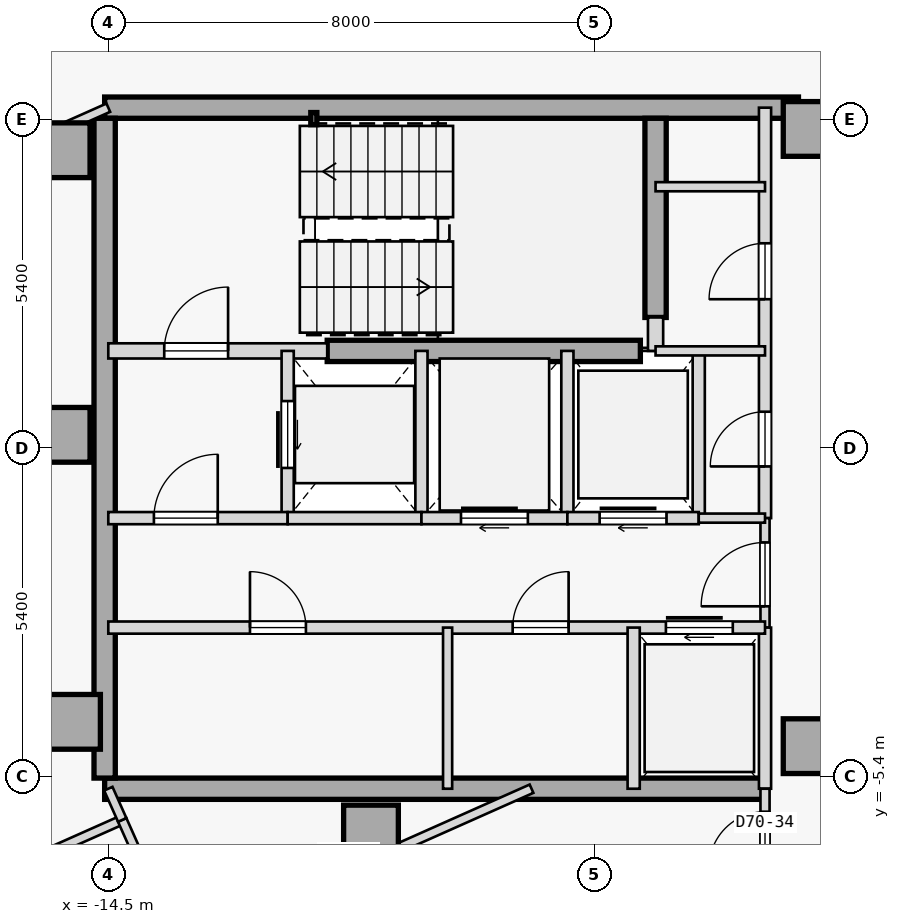
"""IFC4 building model, lengths in metres.
Left out: names, types, materials, properties, quantities, classifications, styles, units other than length and angle.
Written with IfcOpenShell. Run it as: python <this file> out.ifc"""

import sys

from ifc_helpers import new_model, si_unit, direction, frame, frame_2d, origin, origin_2d, place, context, subcontext, project, spatial, rectangle, hollow_rectangle, extrude, element, fill, save


model = new_model("IFC4")
c1 = context("Model", 3, precision=1e-05, world=origin(), true_north=direction((0.0, 1.0)))
c2 = subcontext(c1, "Body", "Model", "MODEL_VIEW")
j1 = project(units=[si_unit("LENGTHUNIT", "METRE"), si_unit("PLANEANGLEUNIT", "RADIAN")], contexts=[c1])
p1 = place(None, origin())
s1 = spatial("IfcSite", under=j1, at=p1, CompositionType="ELEMENT")
p2 = place(p1, origin())
s2 = spatial("IfcBuilding", under=s1, at=p2, CompositionType="ELEMENT")
p3 = place(p2, frame((0.0, 0.0, 262.2)))
s3 = spatial("IfcBuildingStorey", under=s2, at=p3, CompositionType="ELEMENT", Elevation=262.2)
for number, where, z_axis, x_axis in (
    (1, (-15.25, 4.9, 0.0), (0.0, 0.0, 1.0), (1.0, 0.0, 0.0)),
    (2, (-15.25, 0.22, 0.0), (0.0, 0.0, 1.0), (1.0, 0.0, 0.0)),
    (3, (-15.08, -4.5, 0.0), (0.0, 0.0, 1.0), (1.0, 0.0, 0.0)),
    (4, (-10.18, -6.32, 0.0), (0.0, 0.0, 1.0), (1.0, 0.0, 0.0)),
    (5, (-2.95, -4.9, 0.0), (0.0, 0.0, 1.0), (1.0, 0.0, 0.0)),
    (6, (-2.95, 5.25, 0.0), (0.0, 0.0, 1.0), (1.0, 0.0, 0.0)),
):
    element("IfcColumn", number, at=place(p3, frame(where, z_axis=z_axis, x_axis=x_axis)), inside=s3, PredefinedType="COLUMN", context=c2, shape_type="SweptSolid", body=[
        extrude(rectangle(XDim=0.9, YDim=0.9, at=origin_2d()), origin(), (0.0, 0.0, 1.0), 3.35),
    ])
p4 = place(p3, frame((-14.56, 5.6, 0.0), z_axis=(0.0, 0.0, 1.0), x_axis=(1.0, 0.0, 0.0)))
e7 = element("IfcWall", 7, at=p4, inside=s3, PredefinedType="SHEAR", context=c2, shape_type="SweptSolid", body=[
    extrude(rectangle(XDim=11.41, YDim=0.35, at=frame_2d((5.705, 0.0))), origin(), (0.0, 0.0, 1.0), 3.125),
])
p5 = place(p3, frame((-14.56, -5.6, 0.0), z_axis=(0.0, 0.0, 1.0), x_axis=(1.0, 0.0, 0.0)))
e8 = element("IfcWall", 8, at=p5, inside=s3, PredefinedType="SHEAR", context=c2, shape_type="SweptSolid", body=[
    extrude(rectangle(XDim=10.86, YDim=0.35, at=frame_2d((5.43, 0.0))), origin(), (0.0, 0.0, 1.0), 3.125),
])
p6 = place(p3, frame((-14.56, -5.425, 0.0), z_axis=(0.0, 0.0, 1.0), x_axis=(0.0, 1.0, 0.0)))
e9 = element("IfcWall", 9, at=p6, inside=s3, PredefinedType="SHEAR", context=c2, shape_type="SweptSolid", body=[
    extrude(rectangle(XDim=10.85, YDim=0.35, at=frame_2d((5.425, 0.0))), origin(), (0.0, 0.0, 1.0), 3.125),
])
p7 = place(p3, frame((-5.5, 2.15, 0.0), z_axis=(0.0, 0.0, 1.0), x_axis=(0.0, 1.0, 0.0)))
e10 = element("IfcWall", 10, at=p7, inside=s3, PredefinedType="SHEAR", context=c2, shape_type="SweptSolid", body=[
    extrude(rectangle(XDim=3.275, YDim=0.35, at=frame_2d((1.638, 0.0))), origin(), (0.0, 0.0, 1.0), 3.125),
])
p8 = place(p3, frame((-10.9, 1.6, 0.0), z_axis=(0.0, 0.0, 1.0), x_axis=(1.0, 0.0, 0.0)))
e11 = element("IfcWall", 11, at=p8, inside=s3, PredefinedType="SHEAR", context=c2, shape_type="SweptSolid", body=[
    extrude(rectangle(XDim=5.15, YDim=0.35, at=frame_2d((2.575, 0.0))), origin(), (0.0, 0.0, 1.0), 3.125),
])
p9 = place(p3, frame((-11.12, 5.42, 0.0), z_axis=(0.0, 0.0, 1.0), x_axis=(1.0, 0.0, 0.0)))
e12 = element("IfcColumn", 12, at=p9, inside=s3, PredefinedType="COLUMN", context=c2, shape_type="SweptSolid", body=[
    extrude(hollow_rectangle(XDim=0.1, YDim=0.2, WallThickness=0.008, at=origin_2d()), origin(), (0.0, 0.0, 1.0), 3.35),
])
p10 = place(p3, frame((-14.5, 1.6, 0.0), z_axis=(0.0, 0.0, 1.0), x_axis=(1.0, 0.0, 0.0)))
e13 = element("IfcWall", 13, at=p10, inside=s3, PredefinedType="STANDARD", context=c2, shape_type="SweptSolid", body=[
    extrude(rectangle(XDim=3.6, YDim=0.25, at=frame_2d((1.8, 0.0))), origin(), (0.0, 0.0, 1.0), 3.125),
])
p11 = place(p10, frame((0.92, 0.0, 0.0)))
e14 = element("IfcOpeningElement", 14, at=p11, cuts=e13, PredefinedType="OPENING", context=c2, shape_type="SweptSolid", body=[
    extrude(rectangle(XDim=1.05, YDim=2.15, at=frame_2d((0.525, 1.075))), frame((0.0, 0.135, 0.0), z_axis=(0.0, -1.0, 0.0), x_axis=(1.0, 0.0, 0.0)), (0.0, 0.0, 1.0), 0.27),
])
p12 = place(p3, frame((-5.5, 1.6, 0.0), z_axis=(0.0, 0.0, 1.0), x_axis=(0.0, 1.0, 0.0)))
e15 = element("IfcWall", 15, at=p12, inside=s3, PredefinedType="STANDARD", context=c2, shape_type="SweptSolid", body=[
    extrude(rectangle(XDim=0.55, YDim=0.25, at=frame_2d((0.275, 0.0))), origin(), (0.0, 0.0, 1.0), 3.125),
])
p13 = place(p3, frame((-3.7, -1.15, 0.0), z_axis=(0.0, 0.0, 1.0), x_axis=(0.0, 1.0, 0.0)))
e16 = element("IfcWall", 16, at=p13, inside=s3, PredefinedType="STANDARD", context=c2, shape_type="SweptSolid", body=[
    extrude(rectangle(XDim=6.75, YDim=0.2, at=frame_2d((3.375, 0.0))), origin(), (0.0, 0.0, 1.0), 3.125),
])
p14 = place(p13, frame((3.6, 0.0, 0.0)))
e17 = element("IfcOpeningElement", 17, at=p14, cuts=e16, PredefinedType="OPENING", context=c2, shape_type="SweptSolid", body=[
    extrude(rectangle(XDim=0.92, YDim=2.15, at=frame_2d((0.46, 1.075))), frame((0.0, 0.11, 0.0), z_axis=(0.0, -1.0, 0.0), x_axis=(1.0, 0.0, 0.0)), (0.0, 0.0, 1.0), 0.22),
])
p15 = place(p13, frame((0.85, 0.0, 0.0)))
e18 = element("IfcOpeningElement", 18, at=p15, cuts=e16, PredefinedType="OPENING", context=c2, shape_type="SweptSolid", body=[
    extrude(rectangle(XDim=0.9, YDim=2.15, at=frame_2d((0.45, 1.075))), frame((0.0, 0.11, 0.0), z_axis=(0.0, -1.0, 0.0), x_axis=(1.0, 0.0, 0.0)), (0.0, 0.0, 1.0), 0.22),
])
p16 = place(p3, frame((-3.7, -2.95, 0.0), z_axis=(0.0, 0.0, 1.0), x_axis=(0.0, 1.0, 0.0)))
e19 = element("IfcWall", 19, at=p16, inside=s3, PredefinedType="PARTITIONING", context=c2, shape_type="SweptSolid", body=[
    extrude(rectangle(XDim=1.8, YDim=0.15, at=frame_2d((0.9, 0.0))), origin(), (0.0, 0.0, 1.0), 3.125),
])
p17 = place(p16, frame((0.35, 0.0, 0.0)))
e20 = element("IfcOpeningElement", 20, at=p17, cuts=e19, PredefinedType="OPENING", context=c2, shape_type="SweptSolid", body=[
    extrude(rectangle(XDim=1.05, YDim=2.18, at=frame_2d((0.525, 1.09))), frame((0.0, 0.085, 0.0), z_axis=(0.0, -1.0, 0.0), x_axis=(1.0, 0.0, 0.0)), (0.0, 0.0, 1.0), 0.17),
])
p18 = place(p3, frame((-3.7, -5.6, 0.0), z_axis=(0.0, 0.0, 1.0), x_axis=(0.0, 1.0, 0.0)))
e21 = element("IfcWall", 21, at=p18, inside=s3, PredefinedType="STANDARD", context=c2, shape_type="SweptSolid", body=[
    extrude(rectangle(XDim=2.65, YDim=0.2, at=frame_2d((1.325, 0.0))), origin(), (0.0, 0.0, 1.0), 3.125),
])
p19 = place(p3, frame((-11.55, -1.15, 0.0), z_axis=(0.0, 0.0, 1.0), x_axis=(0.0, 1.0, 0.0)))
e22 = element("IfcWall", 22, at=p19, inside=s3, PredefinedType="STANDARD", context=c2, shape_type="SweptSolid", body=[
    extrude(rectangle(XDim=2.75, YDim=0.2, at=frame_2d((1.375, 0.0))), origin(), (0.0, 0.0, 1.0), 3.125),
])
p20 = place(p19, frame((0.825, 0.0, 0.0)))
e23 = element("IfcOpeningElement", 23, at=p20, cuts=e22, PredefinedType="OPENING", context=c2, shape_type="SweptSolid", body=[
    extrude(rectangle(XDim=1.1, YDim=2.15, at=frame_2d((0.55, 1.075))), frame((0.0, 0.11, 0.0), z_axis=(0.0, -1.0, 0.0), x_axis=(1.0, 0.0, 0.0)), (0.0, 0.0, 1.0), 0.22),
])
p21 = place(p3, frame((-9.35, -1.15, 0.0), z_axis=(0.0, 0.0, 1.0), x_axis=(0.0, 1.0, 0.0)))
e24 = element("IfcWall", 24, at=p21, inside=s3, PredefinedType="STANDARD", context=c2, shape_type="SweptSolid", body=[
    extrude(rectangle(XDim=2.75, YDim=0.2, at=frame_2d((1.375, 0.0))), origin(), (0.0, 0.0, 1.0), 3.125),
])
p22 = place(p3, frame((-14.5, -1.15, 0.0), z_axis=(0.0, 0.0, 1.0), x_axis=(1.0, 0.0, 0.0)))
e25 = element("IfcWall", 25, at=p22, inside=s3, PredefinedType="STANDARD", context=c2, shape_type="SweptSolid", body=[
    extrude(rectangle(XDim=2.95, YDim=0.2, at=frame_2d((1.475, 0.0))), origin(), (0.0, 0.0, 1.0), 3.125),
])
p23 = place(p22, frame((0.75, 0.0, 0.0)))
e26 = element("IfcOpeningElement", 26, at=p23, cuts=e25, PredefinedType="OPENING", context=c2, shape_type="SweptSolid", body=[
    extrude(rectangle(XDim=1.05, YDim=2.18, at=frame_2d((0.525, 1.09))), frame((0.0, 0.11, 0.0), z_axis=(0.0, -1.0, 0.0), x_axis=(1.0, 0.0, 0.0)), (0.0, 0.0, 1.0), 0.22),
])
p24 = place(p3, frame((-11.55, -1.15, 0.0), z_axis=(0.0, 0.0, 1.0), x_axis=(1.0, 0.0, 0.0)))
e27 = element("IfcWall", 27, at=p24, inside=s3, PredefinedType="STANDARD", context=c2, shape_type="SweptSolid", body=[
    extrude(rectangle(XDim=2.2, YDim=0.2, at=frame_2d((1.1, 0.0))), origin(), (0.0, 0.0, 1.0), 3.125),
])
p25 = place(p3, frame((-6.95, -1.15, 0.0), z_axis=(0.0, 0.0, 1.0), x_axis=(0.0, 1.0, 0.0)))
e28 = element("IfcWall", 28, at=p25, inside=s3, PredefinedType="STANDARD", context=c2, shape_type="SweptSolid", body=[
    extrude(rectangle(XDim=2.75, YDim=0.2, at=frame_2d((1.375, 0.0))), origin(), (0.0, 0.0, 1.0), 3.125),
])
p26 = place(p3, frame((-9.35, -1.15, 0.0), z_axis=(0.0, 0.0, 1.0), x_axis=(1.0, 0.0, 0.0)))
e29 = element("IfcWall", 29, at=p26, inside=s3, PredefinedType="STANDARD", context=c2, shape_type="SweptSolid", body=[
    extrude(rectangle(XDim=2.4, YDim=0.2, at=frame_2d((1.2, 0.0))), origin(), (0.0, 0.0, 1.0), 3.125),
])
p27 = place(p26, frame((0.65, 0.0, 0.0)))
e30 = element("IfcOpeningElement", 30, at=p27, cuts=e29, PredefinedType="OPENING", context=c2, shape_type="SweptSolid", body=[
    extrude(rectangle(XDim=1.1, YDim=2.15, at=frame_2d((0.55, 1.075))), frame((0.0, 0.11, 0.0), z_axis=(0.0, -1.0, 0.0), x_axis=(1.0, 0.0, 0.0)), (0.0, 0.0, 1.0), 0.22),
])
p28 = place(p3, frame((-4.79, -1.15, 0.0), z_axis=(0.0, 0.0, 1.0), x_axis=(0.0, 1.0, 0.0)))
e31 = element("IfcWall", 31, at=p28, inside=s3, PredefinedType="STANDARD", context=c2, shape_type="SweptSolid", body=[
    extrude(rectangle(XDim=2.75, YDim=0.2, at=frame_2d((1.375, 0.0))), origin(), (0.0, 0.0, 1.0), 3.125),
])
p29 = place(p3, frame((-6.95, -1.15, 0.0), z_axis=(0.0, 0.0, 1.0), x_axis=(1.0, 0.0, 0.0)))
e32 = element("IfcWall", 32, at=p29, inside=s3, PredefinedType="STANDARD", context=c2, shape_type="SweptSolid", body=[
    extrude(rectangle(XDim=2.16, YDim=0.2, at=frame_2d((1.08, 0.0))), origin(), (0.0, 0.0, 1.0), 3.125),
])
p30 = place(p29, frame((0.53, 0.0, 0.0)))
e33 = element("IfcOpeningElement", 33, at=p30, cuts=e32, PredefinedType="OPENING", context=c2, shape_type="SweptSolid", body=[
    extrude(rectangle(XDim=1.1, YDim=2.15, at=frame_2d((0.55, 1.075))), frame((0.0, 0.11, 0.0), z_axis=(0.0, -1.0, 0.0), x_axis=(1.0, 0.0, 0.0)), (0.0, 0.0, 1.0), 0.22),
])
p31 = place(p3, frame((-4.79, -1.15, 0.0), z_axis=(0.0, 0.0, 1.0), x_axis=(1.0, 0.0, 0.0)))
e34 = element("IfcWall", 34, at=p31, inside=s3, PredefinedType="PARTITIONING", context=c2, shape_type="SweptSolid", body=[
    extrude(rectangle(XDim=1.09, YDim=0.15, at=frame_2d((0.545, 0.0))), origin(), (0.0, 0.0, 1.0), 3.125),
])
p32 = place(p3, frame((-14.5, -2.95, 0.0), z_axis=(0.0, 0.0, 1.0), x_axis=(1.0, 0.0, 0.0)))
e35 = element("IfcWall", 35, at=p32, inside=s3, PredefinedType="STANDARD", context=c2, shape_type="SweptSolid", body=[
    extrude(rectangle(XDim=10.8, YDim=0.2, at=frame_2d((5.4, 0.0))), origin(), (0.0, 0.0, 1.0), 3.125),
])
p33 = place(p32, frame((9.17, 0.0, 0.0)))
e36 = element("IfcOpeningElement", 36, at=p33, cuts=e35, PredefinedType="OPENING", context=c2, shape_type="SweptSolid", body=[
    extrude(rectangle(XDim=1.1, YDim=2.15, at=frame_2d((0.55, 1.075))), frame((0.0, 0.11, 0.0), z_axis=(0.0, -1.0, 0.0), x_axis=(1.0, 0.0, 0.0)), (0.0, 0.0, 1.0), 0.22),
])
p34 = place(p32, frame((2.33, 0.0, 0.0)))
e37 = element("IfcOpeningElement", 37, at=p34, cuts=e35, PredefinedType="OPENING", context=c2, shape_type="SweptSolid", body=[
    extrude(rectangle(XDim=0.92, YDim=2.15, at=frame_2d((0.46, 1.075))), frame((0.0, 0.11, 0.0), z_axis=(0.0, -1.0, 0.0), x_axis=(1.0, 0.0, 0.0)), (0.0, 0.0, 1.0), 0.22),
])
p35 = place(p32, frame((6.65, 0.0, 0.0)))
e38 = element("IfcOpeningElement", 38, at=p35, cuts=e35, PredefinedType="OPENING", context=c2, shape_type="SweptSolid", body=[
    extrude(rectangle(XDim=0.92, YDim=2.15, at=frame_2d((0.46, 1.075))), frame((0.0, 0.11, 0.0), z_axis=(0.0, -1.0, 0.0), x_axis=(1.0, 0.0, 0.0)), (0.0, 0.0, 1.0), 0.22),
])
p36 = place(p3, frame((-5.86, -5.6, 0.0), z_axis=(0.0, 0.0, 1.0), x_axis=(0.0, 1.0, 0.0)))
e39 = element("IfcWall", 39, at=p36, inside=s3, PredefinedType="STANDARD", context=c2, shape_type="SweptSolid", body=[
    extrude(rectangle(XDim=2.65, YDim=0.2, at=frame_2d((1.325, 0.0))), origin(), (0.0, 0.0, 1.0), 3.125),
])
p37 = place(p3, frame((-8.92, -5.6, 0.0), z_axis=(0.0, 0.0, 1.0), x_axis=(0.0, 1.0, 0.0)))
e40 = element("IfcWall", 40, at=p37, inside=s3, PredefinedType="PARTITIONING", context=c2, shape_type="SweptSolid", body=[
    extrude(rectangle(XDim=2.65, YDim=0.15, at=frame_2d((1.325, 0.0))), origin(), (0.0, 0.0, 1.0), 3.125),
])
for number, where, z_axis, x_axis in (
    (41, (-5.5, 4.3, 0.0), (0.0, 0.0, 1.0), (1.0, 0.0, 0.0)),
    (42, (-5.5, 1.6, 0.0), (0.0, 0.0, 1.0), (1.0, 0.0, 0.0)),
):
    element("IfcWall", number, at=place(p3, frame(where, z_axis=z_axis, x_axis=x_axis)), inside=s3, PredefinedType="PARTITIONING", context=c2, shape_type="SweptSolid", body=[
        extrude(rectangle(XDim=1.8, YDim=0.15, at=frame_2d((0.9, 0.0))), origin(), (0.0, 0.0, 1.0), 3.125),
    ])
p38 = place(p3, frame((-17.499, 6.038, 0.0), z_axis=(0.0, 0.0, 1.0), x_axis=(0.913541623157, 0.406745255362, 0.0)))
e43 = element("IfcWall", 43, at=p38, inside=s3, PredefinedType="PARTITIONING", context=c2, shape_type="SweptSolid", body=[
    extrude(rectangle(XDim=17.879, YDim=0.15, at=frame_2d((8.939, 0.0))), origin(), (0.0, 0.0, 1.0), 3.125),
])
p39 = place(p38, frame((8.465, 0.0, 0.0)))
e44 = element("IfcOpeningElement", 44, at=p39, cuts=e43, PredefinedType="OPENING", context=c2, shape_type="SweptSolid", body=[
    extrude(rectangle(XDim=0.95, YDim=2.15, at=frame_2d((0.475, 1.075))), frame((0.0, 0.085, 0.0), z_axis=(0.0, -1.0, 0.0), x_axis=(1.0, 0.0, 0.0)), (0.0, 0.0, 1.0), 0.17),
])
p40 = place(p3, frame((-3.7, -7.118, 0.0), z_axis=(0.0, 0.0, 1.0), x_axis=(0.000321543392, 0.999999948305, 0.0)))
e45 = element("IfcWall", 45, at=p40, inside=s3, PredefinedType="PARTITIONING", context=c2, shape_type="SweptSolid", body=[
    extrude(rectangle(XDim=1.519, YDim=0.15, at=frame_2d((0.759, 0.0))), origin(), (0.0, 0.0, 1.0), 3.125),
])
p41 = place(p40, frame((0.22, 0.0, 0.0)))
e46 = element("IfcOpeningElement", 46, at=p41, cuts=e45, PredefinedType="OPENING", context=c2, shape_type="SweptSolid", body=[
    extrude(rectangle(XDim=0.92, YDim=2.15, at=frame_2d((0.46, 1.075))), frame((0.0, 0.085, 0.0), z_axis=(0.0, -1.0, 0.0), x_axis=(1.0, 0.0, 0.0)), (0.0, 0.0, 1.0), 0.17),
])
p42 = place(p3, frame((-18.661, 3.747, 0.0), z_axis=(0.0, 0.0, 1.0), x_axis=(0.913535055583, 0.40676000568, 0.0)))
e47 = element("IfcWall", 47, at=p42, inside=s3, PredefinedType="PARTITIONING", context=c2, shape_type="SweptSolid", body=[
    extrude(rectangle(XDim=4.555, YDim=0.15, at=frame_2d((2.277, 0.0))), origin(), (0.0, 0.0, 1.0), 3.125),
])
p43 = place(p42, frame((1.134, 0.0, 0.0)))
e48 = element("IfcOpeningElement", 48, at=p43, cuts=e47, PredefinedType="OPENING", context=c2, shape_type="SweptSolid", body=[
    extrude(rectangle(XDim=0.92, YDim=2.15, at=frame_2d((0.46, 1.075))), frame((0.0, 0.085, 0.0), z_axis=(0.0, -1.0, 0.0), x_axis=(1.0, 0.0, 0.0)), (0.0, 0.0, 1.0), 0.17),
])
p44 = place(p3, frame((-25.014, -10.896, 0.0), z_axis=(0.0, 0.0, 1.0), x_axis=(0.913544247064, 0.406739362069, 0.0)))
e49 = element("IfcWall", 49, at=p44, inside=s3, PredefinedType="PARTITIONING", context=c2, shape_type="SweptSolid", body=[
    extrude(rectangle(XDim=11.76, YDim=0.15, at=frame_2d((5.88, 0.0))), origin(), (0.0, 0.0, 1.0), 3.125),
])
p45 = place(p44, frame((5.42, 0.0, 0.0)))
e50 = element("IfcOpeningElement", 50, at=p45, cuts=e49, PredefinedType="OPENING", context=c2, shape_type="SweptSolid", body=[
    extrude(rectangle(XDim=0.92, YDim=2.15, at=frame_2d((0.46, 1.075))), frame((0.0, 0.085, 0.0), z_axis=(0.0, -1.0, 0.0), x_axis=(1.0, 0.0, 0.0)), (0.0, 0.0, 1.0), 0.17),
])
p46 = place(p3, frame((-13.348, -8.186, 0.0), z_axis=(0.0, 0.0, 1.0), x_axis=(-0.40673740295, 0.913545119324, 0.0)))
e51 = element("IfcWall", 51, at=p46, inside=s3, PredefinedType="PARTITIONING", context=c2, shape_type="SweptSolid", body=[
    extrude(rectangle(XDim=2.269, YDim=0.15, at=frame_2d((1.134, 0.0))), origin(), (0.0, 0.0, 1.0), 3.125),
])
p47 = place(p3, frame((-14.271, -6.113, 0.0), z_axis=(0.0, 0.0, 1.0), x_axis=(-0.406622099206, 0.913596447255, 0.0)))
e52 = element("IfcWall", 52, at=p47, inside=s3, PredefinedType="PARTITIONING", context=c2, shape_type="SweptSolid", body=[
    extrude(rectangle(XDim=0.562, YDim=0.15, at=frame_2d((0.281, 0.0))), origin(), (0.0, 0.0, 1.0), 3.125),
])
p48 = place(p3, frame((-13.348, -8.186, 0.0), z_axis=(0.0, 0.0, 1.0), x_axis=(0.913551673432, 0.406722681896, 0.0)))
e53 = element("IfcWall", 53, at=p48, inside=s3, PredefinedType="PARTITIONING", context=c2, shape_type="SweptSolid", body=[
    extrude(rectangle(XDim=6.358, YDim=0.15, at=frame_2d((3.179, 0.0))), origin(), (0.0, 0.0, 1.0), 3.125),
])
p49 = place(p48, frame((0.939, 0.0, 0.0)))
e54 = element("IfcOpeningElement", 54, at=p49, cuts=e53, PredefinedType="OPENING", context=c2, shape_type="SweptSolid", body=[
    extrude(rectangle(XDim=0.92, YDim=2.15, at=frame_2d((0.46, 1.075))), frame((0.0, 0.085, 0.0), z_axis=(0.0, -1.0, 0.0), x_axis=(1.0, 0.0, 0.0)), (0.0, 0.0, 1.0), 0.17),
])
p50 = place(p11, origin())
e55 = element("IfcDoor", 55, at=p50, inside=s3, OperationType="SINGLE_SWING_RIGHT", PredefinedType="DOOR", context=c2, shape_type="SweptSolid", body=[
    extrude(rectangle(XDim=1.05, YDim=2.15, at=frame_2d((0.525, 1.075))), frame((0.0, 0.025, 0.0), z_axis=(0.0, -1.0, 0.0), x_axis=(1.0, 0.0, 0.0)), (0.0, 0.0, 1.0), 0.05),
])
fill(e14, e55)
p51 = place(p23, origin())
e56 = element("IfcDoor", 56, at=p51, inside=s3, OperationType="SINGLE_SWING_RIGHT", PredefinedType="DOOR", context=c2, shape_type="SweptSolid", body=[
    extrude(rectangle(XDim=1.05, YDim=2.18, at=frame_2d((0.525, 1.09))), frame((0.0, 0.025, 0.0), z_axis=(0.0, -1.0, 0.0), x_axis=(1.0, 0.0, 0.0)), (0.0, 0.0, 1.0), 0.05),
])
fill(e26, e56)
p52 = place(p17, origin())
e57 = element("IfcDoor", 57, at=p52, inside=s3, OperationType="SINGLE_SWING_LEFT", PredefinedType="DOOR", context=c2, shape_type="SweptSolid", body=[
    extrude(rectangle(XDim=1.05, YDim=2.18, at=frame_2d((0.525, 1.09))), frame((0.0, 0.025, 0.0), z_axis=(0.0, -1.0, 0.0), x_axis=(1.0, 0.0, 0.0)), (0.0, 0.0, 1.0), 0.05),
])
fill(e20, e57)
p53 = place(p20, origin())
e58 = element("IfcDoor", 58, at=p53, inside=s3, OperationType="SLIDING_TO_RIGHT", PredefinedType="DOOR", context=c2, shape_type="SweptSolid", body=[
    extrude(rectangle(XDim=1.1, YDim=2.15, at=frame_2d((0.55, 1.075))), frame((0.0, 0.025, 0.0), z_axis=(0.0, -1.0, 0.0), x_axis=(1.0, 0.0, 0.0)), (0.0, 0.0, 1.0), 0.05),
])
fill(e23, e58)
p54 = place(p27, origin())
e59 = element("IfcDoor", 59, at=p54, inside=s3, OperationType="SLIDING_TO_RIGHT", PredefinedType="DOOR", context=c2, shape_type="SweptSolid", body=[
    extrude(rectangle(XDim=1.1, YDim=2.15, at=frame_2d((0.55, 1.075))), frame((0.0, 0.025, 0.0), z_axis=(0.0, -1.0, 0.0), x_axis=(1.0, 0.0, 0.0)), (0.0, 0.0, 1.0), 0.05),
])
fill(e30, e59)
p55 = place(p30, origin())
e60 = element("IfcDoor", 60, at=p55, inside=s3, OperationType="SLIDING_TO_RIGHT", PredefinedType="DOOR", context=c2, shape_type="SweptSolid", body=[
    extrude(rectangle(XDim=1.1, YDim=2.15, at=frame_2d((0.55, 1.075))), frame((0.0, 0.025, 0.0), z_axis=(0.0, -1.0, 0.0), x_axis=(1.0, 0.0, 0.0)), (0.0, 0.0, 1.0), 0.05),
])
fill(e33, e60)
p56 = place(p33, origin())
e61 = element("IfcDoor", 61, at=p56, inside=s3, OperationType="SLIDING_TO_RIGHT", PredefinedType="DOOR", context=c2, shape_type="SweptSolid", body=[
    extrude(rectangle(XDim=1.1, YDim=2.15, at=frame_2d((0.55, 1.075))), frame((0.0, 0.025, 0.0), z_axis=(0.0, -1.0, 0.0), x_axis=(1.0, 0.0, 0.0)), (0.0, 0.0, 1.0), 0.05),
])
fill(e36, e61)
p57 = place(p34, origin())
e62 = element("IfcDoor", 62, at=p57, inside=s3, OperationType="SINGLE_SWING_LEFT", PredefinedType="DOOR", context=c2, shape_type="SweptSolid", body=[
    extrude(rectangle(XDim=0.92, YDim=2.15, at=frame_2d((0.46, 1.075))), frame((0.0, 0.025, 0.0), z_axis=(0.0, -1.0, 0.0), x_axis=(1.0, 0.0, 0.0)), (0.0, 0.0, 1.0), 0.05),
])
fill(e37, e62)
p58 = place(p35, origin())
e63 = element("IfcDoor", 63, at=p58, inside=s3, OperationType="SINGLE_SWING_RIGHT", PredefinedType="DOOR", context=c2, shape_type="SweptSolid", body=[
    extrude(rectangle(XDim=0.92, YDim=2.15, at=frame_2d((0.46, 1.075))), frame((0.0, 0.025, 0.0), z_axis=(0.0, -1.0, 0.0), x_axis=(1.0, 0.0, 0.0)), (0.0, 0.0, 1.0), 0.05),
])
fill(e38, e63)
p59 = place(p14, origin())
e64 = element("IfcDoor", 64, at=p59, inside=s3, OperationType="SINGLE_SWING_LEFT", PredefinedType="DOOR", context=c2, shape_type="SweptSolid", body=[
    extrude(rectangle(XDim=0.92, YDim=2.15, at=frame_2d((0.46, 1.075))), frame((0.0, 0.025, 0.0), z_axis=(0.0, -1.0, 0.0), x_axis=(1.0, 0.0, 0.0)), (0.0, 0.0, 1.0), 0.05),
])
fill(e17, e64)
p60 = place(p15, origin())
e65 = element("IfcDoor", 65, at=p60, inside=s3, OperationType="SINGLE_SWING_LEFT", PredefinedType="DOOR", context=c2, shape_type="SweptSolid", body=[
    extrude(rectangle(XDim=0.9, YDim=2.15, at=frame_2d((0.45, 1.075))), frame((0.0, 0.025, 0.0), z_axis=(0.0, -1.0, 0.0), x_axis=(1.0, 0.0, 0.0)), (0.0, 0.0, 1.0), 0.05),
])
fill(e18, e65)
p61 = place(p41, origin())
e66 = element("IfcDoor", 66, at=p61, inside=s3, OperationType="SINGLE_SWING_LEFT", PredefinedType="DOOR", context=c2, shape_type="SweptSolid", body=[
    extrude(rectangle(XDim=0.92, YDim=2.15, at=frame_2d((0.46, 1.075))), frame((0.0, 0.025, 0.0), z_axis=(0.0, -1.0, 0.0), x_axis=(1.0, 0.0, 0.0)), (0.0, 0.0, 1.0), 0.05),
])
fill(e46, e66)
save(model, sys.argv[1])
